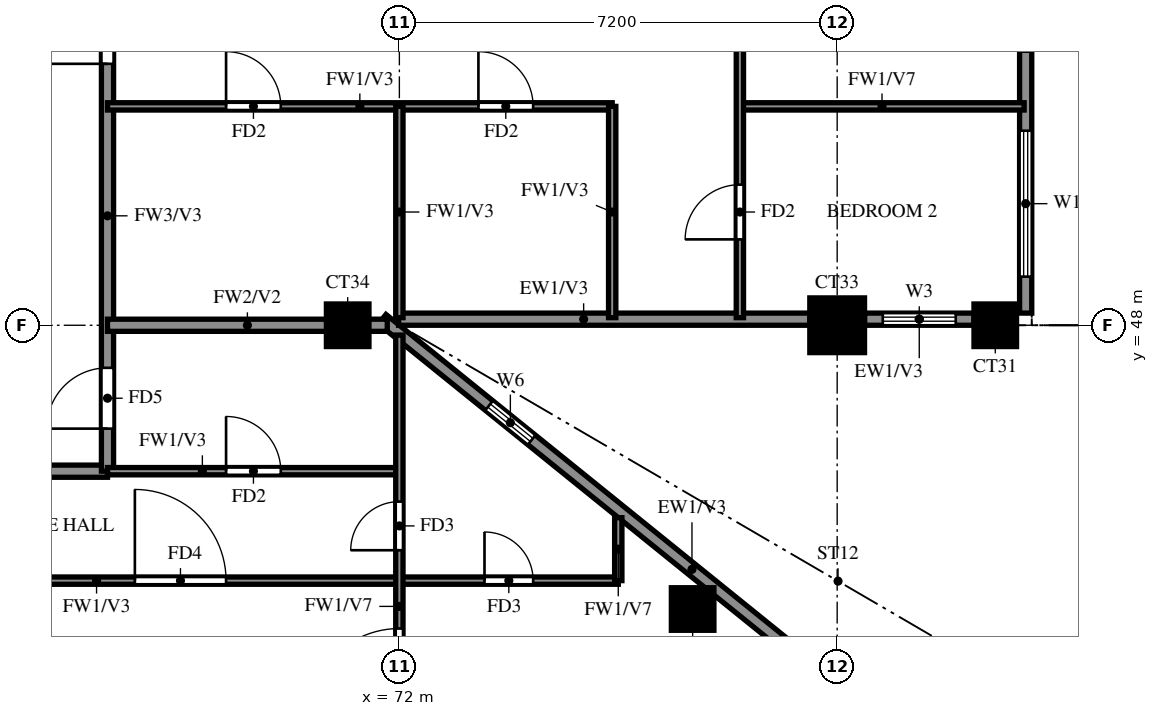
"""IFC4 building model, lengths in metres.
Left out: names, types, materials, properties, quantities, classifications, styles, units other than length and angle.
Written with IfcOpenShell. Run it as: python <this file> out.ifc"""

import sys

from ifc_helpers import new_model, si_unit, direction, frame, frame_2d, origin, origin_2d, place, context, subcontext, project, spatial, rectangle, extrude, source, transform, mapped, element, fill, save


model = new_model("IFC4")
c1 = context("Model", 3, precision=1e-05, world=origin(), true_north=direction((0.0, 1.0)))
c2 = subcontext(c1, "Body", "Model", "MODEL_VIEW")
j1 = project(units=[si_unit("LENGTHUNIT", "METRE"), si_unit("PLANEANGLEUNIT", "RADIAN")], contexts=[c1])
p1 = place(None, origin())
s1 = spatial("IfcSite", under=j1, at=p1, CompositionType="ELEMENT")
p2 = place(p1, origin())
s2 = spatial("IfcBuilding", under=s1, at=p2, CompositionType="ELEMENT")
p3 = place(p2, frame((0.0, 0.0, 211.5)))
s3 = spatial("IfcBuildingStorey", under=s2, at=p3, CompositionType="ELEMENT", Elevation=211.5)
m1 = source(origin(), c2, "Body", "SweptSolid", [
    extrude(rectangle(XDim=0.7, YDim=0.7, at=origin_2d()), origin(), (0.0, 0.0, 1.0), 3.5),
])
p4 = place(p3, frame((76.823, 43.333, -0.28), z_axis=(0.0, 0.0, 1.0), x_axis=(1.0, 0.0, 0.0)))
e1 = element("IfcColumn", 1, at=p4, inside=s3, PredefinedType="COLUMN", context=c2, shape_type="MappedRepresentation", body=[
    mapped(m1, transform((0.0, 0.0, 0.0))),
])
m2 = source(origin(), c2, "Body", "SweptSolid", [
    extrude(rectangle(XDim=0.7, YDim=0.7, at=origin_2d()), origin(), (0.0, 0.0, 1.0), 3.22),
])
p5 = place(p3, frame((71.15, 48.0, 0.0), z_axis=(0.0, 0.0, 1.0), x_axis=(1.0, 0.0, 0.0)))
e2 = element("IfcColumn", 2, at=p5, inside=s3, PredefinedType="COLUMN", context=c2, shape_type="MappedRepresentation", body=[
    mapped(m2, transform((0.0, 0.0, 0.0))),
])
m3 = source(origin(), c2, "Body", "SweptSolid", [
    extrude(rectangle(XDim=0.9, YDim=0.9, at=origin_2d()), origin(), (0.0, 0.0, 1.0), 3.22),
])
p6 = place(p3, frame((79.2, 48.0, 0.0), z_axis=(0.0, 0.0, 1.0), x_axis=(1.0, 0.0, 0.0)))
e3 = element("IfcColumn", 3, at=p6, inside=s3, PredefinedType="COLUMN", context=c2, shape_type="MappedRepresentation", body=[
    mapped(m3, transform((0.0, 0.0, 0.0))),
])
p7 = place(p3, frame((81.8, 48.0, -0.28), z_axis=(0.0, 0.0, 1.0), x_axis=(1.0, 0.0, 0.0)))
e4 = element("IfcColumn", 4, at=p7, inside=s3, PredefinedType="COLUMN", context=c2, shape_type="MappedRepresentation", body=[
    mapped(m1, transform((0.0, 0.0, 0.0))),
])
p8 = place(p3, frame((81.907, 39.87, 0.0), z_axis=(0.0, 0.0, 1.0), x_axis=(-0.777936274417, 0.62834318087, 0.0)))
e5 = element("IfcWall", 5, at=p8, inside=s3, PredefinedType="SOLIDWALL", context=c2, shape_type="SweptSolid", body=[
    extrude(rectangle(XDim=13.099, YDim=0.2, at=frame_2d((6.549, 0.0))), origin(), (0.0, 0.0, 1.0), 3.22),
])
p9 = place(p8, frame((2.201, 0.0, 0.0)))
e6 = element("IfcOpeningElement", 6, at=p9, cuts=e5, PredefinedType="OPENING", context=c2, shape_type="SweptSolid", body=[
    extrude(rectangle(XDim=1.8, YDim=2.4, at=frame_2d((0.9, 1.2))), frame((0.0, 0.11, 0.0), z_axis=(0.0, -1.0, 0.0), x_axis=(1.0, 0.0, 0.0)), (0.0, 0.0, 1.0), 0.22),
])
p10 = place(p8, frame((9.938, 0.0, 1.5)))
e7 = element("IfcOpeningElement", 7, at=p10, cuts=e5, PredefinedType="OPENING", context=c2, shape_type="SweptSolid", body=[
    extrude(rectangle(XDim=0.9, YDim=0.9, at=frame_2d((0.45, 0.45))), frame((0.0, 0.11, 0.0), z_axis=(0.0, -1.0, 0.0), x_axis=(1.0, 0.0, 0.0)), (0.0, 0.0, 1.0), 0.22),
])
p11 = place(p3, frame((71.987, 48.1, 0.0), z_axis=(0.0, 0.0, 1.0), x_axis=(1.0, 0.0, 0.0)))
e8 = element("IfcWall", 8, at=p11, inside=s3, PredefinedType="SOLIDWALL", context=c2, shape_type="SweptSolid", body=[
    extrude(rectangle(XDim=6.763, YDim=0.2, at=frame_2d((3.381, 0.0))), origin(), (0.0, 0.0, 1.0), 3.22),
])
p12 = place(p3, frame((79.65, 48.1, 0.0), z_axis=(0.0, 0.0, 1.0), x_axis=(1.0, 0.0, 0.0)))
e9 = element("IfcWall", 9, at=p12, inside=s3, PredefinedType="SOLIDWALL", context=c2, shape_type="SweptSolid", body=[
    extrude(rectangle(XDim=1.8, YDim=0.2, at=frame_2d((0.9, 0.0))), origin(), (0.0, 0.0, 1.0), 3.22),
])
p13 = place(p12, frame((0.3, 0.0, 0.6)))
e10 = element("IfcOpeningElement", 10, at=p13, cuts=e9, PredefinedType="OPENING", context=c2, shape_type="SweptSolid", body=[
    extrude(rectangle(XDim=1.2, YDim=2.4, at=frame_2d((0.6, 1.2))), frame((0.0, 0.11, 0.0), z_axis=(0.0, -1.0, 0.0), x_axis=(1.0, 0.0, 0.0)), (0.0, 0.0, 1.0), 0.22),
])
p14 = place(p3, frame((82.3, 48.2, 0.0), z_axis=(0.0, 0.0, 1.0), x_axis=(0.0, 1.0, 0.0)))
e11 = element("IfcWall", 11, at=p14, inside=s3, PredefinedType="SOLIDWALL", context=c2, shape_type="SweptSolid", body=[
    extrude(rectangle(XDim=28.6, YDim=0.2, at=frame_2d((14.3, 0.0))), origin(), (0.0, 0.0, 1.0), 3.22),
])
p15 = place(p14, frame((4.3, 0.0, 0.0)))
e12 = element("IfcOpeningElement", 12, at=p15, cuts=e11, PredefinedType="OPENING", context=c2, shape_type="SweptSolid", body=[
    extrude(rectangle(XDim=1.8, YDim=2.4, at=frame_2d((0.9, 1.2))), frame((0.0, 0.11, 0.0), z_axis=(0.0, -1.0, 0.0), x_axis=(1.0, 0.0, 0.0)), (0.0, 0.0, 1.0), 0.22),
])
p16 = place(p14, frame((0.6, 0.0, 0.6)))
e13 = element("IfcOpeningElement", 13, at=p16, cuts=e11, PredefinedType="OPENING", context=c2, shape_type="SweptSolid", body=[
    extrude(rectangle(XDim=2.4, YDim=2.4, at=frame_2d((1.2, 1.2))), frame((0.0, 0.11, 0.0), z_axis=(0.0, -1.0, 0.0), x_axis=(1.0, 0.0, 0.0)), (0.0, 0.0, 1.0), 0.22),
])
p17 = place(p14, frame((7.3, 0.0, 0.6)))
e14 = element("IfcOpeningElement", 14, at=p17, cuts=e11, PredefinedType="OPENING", context=c2, shape_type="SweptSolid", body=[
    extrude(rectangle(XDim=2.4, YDim=2.4, at=frame_2d((1.2, 1.2))), frame((0.0, 0.11, 0.0), z_axis=(0.0, -1.0, 0.0), x_axis=(1.0, 0.0, 0.0)), (0.0, 0.0, 1.0), 0.22),
])
p18 = place(p14, frame((11.2, 0.0, 0.6)))
e15 = element("IfcOpeningElement", 15, at=p18, cuts=e11, PredefinedType="OPENING", context=c2, shape_type="SweptSolid", body=[
    extrude(rectangle(XDim=2.4, YDim=2.4, at=frame_2d((1.2, 1.2))), frame((0.0, 0.11, 0.0), z_axis=(0.0, -1.0, 0.0), x_axis=(1.0, 0.0, 0.0)), (0.0, 0.0, 1.0), 0.22),
])
p19 = place(p14, frame((15.033, 0.0, 0.6)))
e16 = element("IfcOpeningElement", 16, at=p19, cuts=e11, PredefinedType="OPENING", context=c2, shape_type="SweptSolid", body=[
    extrude(rectangle(XDim=2.4, YDim=2.4, at=frame_2d((1.2, 1.2))), frame((0.0, 0.11, 0.0), z_axis=(0.0, -1.0, 0.0), x_axis=(1.0, 0.0, 0.0)), (0.0, 0.0, 1.0), 0.22),
])
p20 = place(p14, frame((18.167, 0.0, 0.6)))
e17 = element("IfcOpeningElement", 17, at=p20, cuts=e11, PredefinedType="OPENING", context=c2, shape_type="SweptSolid", body=[
    extrude(rectangle(XDim=2.4, YDim=2.4, at=frame_2d((1.2, 1.2))), frame((0.0, 0.11, 0.0), z_axis=(0.0, -1.0, 0.0), x_axis=(1.0, 0.0, 0.0)), (0.0, 0.0, 1.0), 0.22),
])
p21 = place(p14, frame((22.75, 0.0, 1.5)))
e18 = element("IfcOpeningElement", 18, at=p21, cuts=e11, PredefinedType="OPENING", context=c2, shape_type="SweptSolid", body=[
    extrude(rectangle(XDim=0.9, YDim=0.9, at=frame_2d((0.45, 0.45))), frame((0.0, 0.11, 0.0), z_axis=(0.0, -1.0, 0.0), x_axis=(1.0, 0.0, 0.0)), (0.0, 0.0, 1.0), 0.22),
])
p22 = place(p14, frame((25.5, 0.0, 0.6)))
e19 = element("IfcOpeningElement", 19, at=p22, cuts=e11, PredefinedType="OPENING", context=c2, shape_type="SweptSolid", body=[
    extrude(rectangle(XDim=2.4, YDim=2.4, at=frame_2d((1.2, 1.2))), frame((0.0, 0.11, 0.0), z_axis=(0.0, -1.0, 0.0), x_axis=(1.0, 0.0, 0.0)), (0.0, 0.0, 1.0), 0.22),
])
p23 = place(p3, frame((60.0, 45.6, 0.0), z_axis=(0.0, 0.0, 1.0), x_axis=(1.0, 0.0, 0.0)))
e20 = element("IfcWall", 20, at=p23, inside=s3, PredefinedType="SOLIDWALL", context=c2, shape_type="SweptSolid", body=[
    extrude(rectangle(XDim=7.2, YDim=0.2, at=frame_2d((3.6, 0.0))), origin(), (0.0, 0.0, 1.0), 3.22),
])
p24 = place(p3, frame((67.2, 45.6, 0.0), z_axis=(0.0, 0.0, 1.0), x_axis=(0.0, 1.0, 0.0)))
e21 = element("IfcWall", 21, at=p24, inside=s3, PredefinedType="SOLIDWALL", context=c2, shape_type="SweptSolid", body=[
    extrude(rectangle(XDim=8.4, YDim=0.2, at=frame_2d((4.2, 0.0))), origin(), (0.0, 0.0, 1.0), 3.22),
])
p25 = place(p24, frame((6.7, 0.0, 0.0)))
e22 = element("IfcOpeningElement", 22, at=p25, cuts=e21, PredefinedType="OPENING", context=c2, shape_type="SweptSolid", body=[
    extrude(rectangle(XDim=1.0, YDim=2.1, at=frame_2d((0.5, 1.05))), frame((0.0, 0.11, 0.0), z_axis=(0.0, -1.0, 0.0), x_axis=(1.0, 0.0, 0.0)), (0.0, 0.0, 1.0), 0.22),
])
p26 = place(p24, frame((0.7, 0.0, 0.0)))
e23 = element("IfcOpeningElement", 23, at=p26, cuts=e21, PredefinedType="OPENING", context=c2, shape_type="SweptSolid", body=[
    extrude(rectangle(XDim=1.0, YDim=2.1, at=frame_2d((0.5, 1.05))), frame((0.0, 0.11, 0.0), z_axis=(0.0, -1.0, 0.0), x_axis=(1.0, 0.0, 0.0)), (0.0, 0.0, 1.0), 0.22),
])
p27 = place(p3, frame((67.2, 48.0, 0.0), z_axis=(0.0, 0.0, 1.0), x_axis=(1.0, 0.0, 0.0)))
e24 = element("IfcWall", 24, at=p27, inside=s3, PredefinedType="SOLIDWALL", context=c2, shape_type="SweptSolid", body=[
    extrude(rectangle(XDim=4.601, YDim=0.2, at=frame_2d((2.301, 0.0))), origin(), (0.0, 0.0, 1.0), 3.22),
])
p28 = place(p3, frame((60.0, 43.8, 0.0), z_axis=(0.0, 0.0, 1.0), x_axis=(1.0, 0.0, 0.0)))
e25 = element("IfcWall", 25, at=p28, inside=s3, PredefinedType="PARTITIONING", context=c2, shape_type="SweptSolid", body=[
    extrude(rectangle(XDim=15.6, YDim=0.12, at=frame_2d((7.8, 0.0))), origin(), (0.0, 0.0, 1.0), 3.22),
])
p29 = place(p28, frame((7.65, 0.0, 0.0)))
e26 = element("IfcOpeningElement", 26, at=p29, cuts=e25, PredefinedType="OPENING", context=c2, shape_type="SweptSolid", body=[
    extrude(rectangle(XDim=1.5, YDim=2.1, at=frame_2d((0.75, 1.05))), frame((0.0, 0.07, 0.0), z_axis=(0.0, -1.0, 0.0), x_axis=(1.0, 0.0, 0.0)), (0.0, 0.0, 1.0), 0.14),
])
p30 = place(p28, frame((1.95, 0.0, 0.0)))
e27 = element("IfcOpeningElement", 27, at=p30, cuts=e25, PredefinedType="OPENING", context=c2, shape_type="SweptSolid", body=[
    extrude(rectangle(XDim=0.9, YDim=2.1, at=frame_2d((0.45, 1.05))), frame((0.0, 0.07, 0.0), z_axis=(0.0, -1.0, 0.0), x_axis=(1.0, 0.0, 0.0)), (0.0, 0.0, 1.0), 0.14),
])
p31 = place(p28, frame((13.4, 0.0, 0.0)))
e28 = element("IfcOpeningElement", 28, at=p31, cuts=e25, PredefinedType="OPENING", context=c2, shape_type="SweptSolid", body=[
    extrude(rectangle(XDim=0.8, YDim=2.1, at=frame_2d((0.4, 1.05))), frame((0.0, 0.07, 0.0), z_axis=(0.0, -1.0, 0.0), x_axis=(1.0, 0.0, 0.0)), (0.0, 0.0, 1.0), 0.14),
])
p32 = place(p3, frame((67.2, 45.6, 0.0), z_axis=(0.0, 0.0, 1.0), x_axis=(1.0, 0.0, 0.0)))
e29 = element("IfcWall", 29, at=p32, inside=s3, PredefinedType="PARTITIONING", context=c2, shape_type="SweptSolid", body=[
    extrude(rectangle(XDim=4.8, YDim=0.12, at=frame_2d((2.4, 0.0))), origin(), (0.0, 0.0, 1.0), 3.22),
])
p33 = place(p32, frame((1.95, 0.0, 0.0)))
e30 = element("IfcOpeningElement", 30, at=p33, cuts=e29, PredefinedType="OPENING", context=c2, shape_type="SweptSolid", body=[
    extrude(rectangle(XDim=0.9, YDim=2.1, at=frame_2d((0.45, 1.05))), frame((0.0, 0.07, 0.0), z_axis=(0.0, -1.0, 0.0), x_axis=(1.0, 0.0, 0.0)), (0.0, 0.0, 1.0), 0.14),
])
p34 = place(p3, frame((67.2, 51.6, 0.0), z_axis=(0.0, 0.0, 1.0), x_axis=(1.0, 0.0, 0.0)))
e31 = element("IfcWall", 31, at=p34, inside=s3, PredefinedType="PARTITIONING", context=c2, shape_type="SweptSolid", body=[
    extrude(rectangle(XDim=8.3, YDim=0.12, at=frame_2d((4.15, 0.0))), origin(), (0.0, 0.0, 1.0), 3.22),
])
p35 = place(p34, frame((6.1, 0.0, 0.0)))
e32 = element("IfcOpeningElement", 32, at=p35, cuts=e31, PredefinedType="OPENING", context=c2, shape_type="SweptSolid", body=[
    extrude(rectangle(XDim=0.9, YDim=2.1, at=frame_2d((0.45, 1.05))), frame((0.0, 0.07, 0.0), z_axis=(0.0, -1.0, 0.0), x_axis=(1.0, 0.0, 0.0)), (0.0, 0.0, 1.0), 0.14),
])
p36 = place(p34, frame((1.95, 0.0, 0.0)))
e33 = element("IfcOpeningElement", 33, at=p36, cuts=e31, PredefinedType="OPENING", context=c2, shape_type="SweptSolid", body=[
    extrude(rectangle(XDim=0.9, YDim=2.1, at=frame_2d((0.45, 1.05))), frame((0.0, 0.07, 0.0), z_axis=(0.0, -1.0, 0.0), x_axis=(1.0, 0.0, 0.0)), (0.0, 0.0, 1.0), 0.14),
])
p37 = place(p3, frame((77.6, 51.6, 0.0), z_axis=(0.0, 0.0, 1.0), x_axis=(1.0, 0.0, 0.0)))
e34 = element("IfcWall", 34, at=p37, inside=s3, PredefinedType="PARTITIONING", context=c2, shape_type="SweptSolid", body=[
    extrude(rectangle(XDim=4.675, YDim=0.12, at=frame_2d((2.337, 0.0))), origin(), (0.0, 0.0, 1.0), 2.32),
])
p38 = place(p3, frame((72.0, 39.725, 0.0), z_axis=(0.0, 0.0, 1.0), x_axis=(0.0, 1.0, 0.0)))
e35 = element("IfcWall", 35, at=p38, inside=s3, PredefinedType="PARTITIONING", context=c2, shape_type="SweptSolid", body=[
    extrude(rectangle(XDim=8.114, YDim=0.12, at=frame_2d((4.057, 0.0))), origin(), (0.0, 0.0, 1.0), 2.32),
])
p39 = place(p38, frame((1.788, 0.0, 0.0)))
e36 = element("IfcOpeningElement", 36, at=p39, cuts=e35, PredefinedType="OPENING", context=c2, shape_type="SweptSolid", body=[
    extrude(rectangle(XDim=1.5, YDim=2.1, at=frame_2d((0.75, 1.05))), frame((0.0, 0.07, 0.0), z_axis=(0.0, -1.0, 0.0), x_axis=(1.0, 0.0, 0.0)), (0.0, 0.0, 1.0), 0.14),
])
p40 = place(p38, frame((4.575, 0.0, 0.0)))
e37 = element("IfcOpeningElement", 37, at=p40, cuts=e35, PredefinedType="OPENING", context=c2, shape_type="SweptSolid", body=[
    extrude(rectangle(XDim=0.8, YDim=2.1, at=frame_2d((0.4, 1.05))), frame((0.0, 0.07, 0.0), z_axis=(0.0, -1.0, 0.0), x_axis=(1.0, 0.0, 0.0)), (0.0, 0.0, 1.0), 0.14),
])
for number, where, z_axis, x_axis in (
    (38, (72.0, 48.125, 0.0), (0.0, 0.0, 1.0), (0.0, 1.0, 0.0)),
    (39, (75.5, 48.125, 0.0), (0.0, 0.0, 1.0), (0.0, 1.0, 0.0)),
):
    element("IfcWall", number, at=place(p3, frame(where, z_axis=z_axis, x_axis=x_axis)), inside=s3, PredefinedType="PARTITIONING", context=c2, shape_type="SweptSolid", body=[
        extrude(rectangle(XDim=3.475, YDim=0.12, at=frame_2d((1.738, 0.0))), origin(), (0.0, 0.0, 1.0), 3.22),
    ])
p41 = place(p3, frame((75.6, 43.8, 0.0), z_axis=(0.0, 0.0, 1.0), x_axis=(0.0, 1.0, 0.0)))
e40 = element("IfcWall", 40, at=p41, inside=s3, PredefinedType="PARTITIONING", context=c2, shape_type="SweptSolid", body=[
    extrude(rectangle(XDim=1.035, YDim=0.12, at=frame_2d((0.518, 0.0))), origin(), (0.0, 0.0, 1.0), 2.32),
])
p42 = place(p3, frame((77.6, 48.125, 0.0), z_axis=(0.0, 0.0, 1.0), x_axis=(0.0, 1.0, 0.0)))
e41 = element("IfcWall", 41, at=p42, inside=s3, PredefinedType="PARTITIONING", context=c2, shape_type="SweptSolid", body=[
    extrude(rectangle(XDim=21.475, YDim=0.12, at=frame_2d((10.738, 0.0))), origin(), (0.0, 0.0, 1.0), 3.22),
])
p43 = place(p42, frame((1.288, 0.0, 0.0)))
e42 = element("IfcOpeningElement", 42, at=p43, cuts=e41, PredefinedType="OPENING", context=c2, shape_type="SweptSolid", body=[
    extrude(rectangle(XDim=0.9, YDim=2.1, at=frame_2d((0.45, 1.05))), frame((0.0, 0.07, 0.0), z_axis=(0.0, -1.0, 0.0), x_axis=(1.0, 0.0, 0.0)), (0.0, 0.0, 1.0), 0.14),
])
p44 = place(p42, frame((7.825, 0.0, 0.0)))
e43 = element("IfcOpeningElement", 43, at=p44, cuts=e41, PredefinedType="OPENING", context=c2, shape_type="SweptSolid", body=[
    extrude(rectangle(XDim=1.5, YDim=2.1, at=frame_2d((0.75, 1.05))), frame((0.0, 0.07, 0.0), z_axis=(0.0, -1.0, 0.0), x_axis=(1.0, 0.0, 0.0)), (0.0, 0.0, 1.0), 0.14),
])
p45 = place(p42, frame((12.025, 0.0, 0.0)))
e44 = element("IfcOpeningElement", 44, at=p45, cuts=e41, PredefinedType="OPENING", context=c2, shape_type="SweptSolid", body=[
    extrude(rectangle(XDim=0.9, YDim=2.1, at=frame_2d((0.45, 1.05))), frame((0.0, 0.07, 0.0), z_axis=(0.0, -1.0, 0.0), x_axis=(1.0, 0.0, 0.0)), (0.0, 0.0, 1.0), 0.14),
])
p46 = place(p42, frame((17.425, 0.0, 0.0)))
e45 = element("IfcOpeningElement", 45, at=p46, cuts=e41, PredefinedType="OPENING", context=c2, shape_type="SweptSolid", body=[
    extrude(rectangle(XDim=0.9, YDim=2.1, at=frame_2d((0.45, 1.05))), frame((0.0, 0.07, 0.0), z_axis=(0.0, -1.0, 0.0), x_axis=(1.0, 0.0, 0.0)), (0.0, 0.0, 1.0), 0.14),
])
p47 = place(p10, origin())
e46 = element("IfcWindow", 46, at=p47, inside=s3, PartitioningType="SINGLE_PANEL", PredefinedType="WINDOW", context=c2, shape_type="SweptSolid", body=[
    extrude(rectangle(XDim=0.9, YDim=0.9, at=frame_2d((0.45, 0.45))), frame((0.0, 0.03, 0.0), z_axis=(0.0, -1.0, 0.0), x_axis=(1.0, 0.0, 0.0)), (0.0, 0.0, 1.0), 0.06),
])
fill(e7, e46)
p48 = place(p13, origin())
e47 = element("IfcWindow", 47, at=p48, inside=s3, PartitioningType="SINGLE_PANEL", PredefinedType="WINDOW", context=c2, shape_type="SweptSolid", body=[
    extrude(rectangle(XDim=1.2, YDim=2.4, at=frame_2d((0.6, 1.2))), frame((0.0, 0.03, 0.0), z_axis=(0.0, -1.0, 0.0), x_axis=(1.0, 0.0, 0.0)), (0.0, 0.0, 1.0), 0.06),
])
fill(e10, e47)
p49 = place(p15, origin())
e48 = element("IfcDoor", 48, at=p49, inside=s3, OperationType="DOUBLE_DOOR_SLIDING", PredefinedType="DOOR", context=c2, shape_type="SweptSolid", body=[
    extrude(rectangle(XDim=1.8, YDim=2.4, at=frame_2d((0.9, 1.2))), frame((0.0, 0.025, 0.0), z_axis=(0.0, -1.0, 0.0), x_axis=(1.0, 0.0, 0.0)), (0.0, 0.0, 1.0), 0.05),
])
fill(e12, e48)
p50 = place(p16, origin())
e49 = element("IfcWindow", 49, at=p50, inside=s3, PartitioningType="DOUBLE_PANEL_VERTICAL", PredefinedType="WINDOW", context=c2, shape_type="SweptSolid", body=[
    extrude(rectangle(XDim=2.4, YDim=2.4, at=frame_2d((1.2, 1.2))), frame((0.0, 0.03, 0.0), z_axis=(0.0, -1.0, 0.0), x_axis=(1.0, 0.0, 0.0)), (0.0, 0.0, 1.0), 0.06),
])
fill(e13, e49)
p51 = place(p25, origin())
e50 = element("IfcDoor", 50, at=p51, inside=s3, OperationType="SINGLE_SWING_RIGHT", PredefinedType="DOOR", context=c2, shape_type="SweptSolid", body=[
    extrude(rectangle(XDim=1.0, YDim=2.1, at=frame_2d((0.5, 1.05))), frame((0.0, 0.025, 0.0), z_axis=(0.0, -1.0, 0.0), x_axis=(1.0, 0.0, 0.0)), (0.0, 0.0, 1.0), 0.05),
])
fill(e22, e50)
p52 = place(p43, origin())
e51 = element("IfcDoor", 51, at=p52, inside=s3, OperationType="SINGLE_SWING_LEFT", PredefinedType="DOOR", context=c2, shape_type="SweptSolid", body=[
    extrude(rectangle(XDim=0.9, YDim=2.1, at=frame_2d((0.45, 1.05))), frame((0.0, 0.025, 0.0), z_axis=(0.0, -1.0, 0.0), x_axis=(1.0, 0.0, 0.0)), (0.0, 0.0, 1.0), 0.05),
])
fill(e42, e51)
p53 = place(p35, origin())
e52 = element("IfcDoor", 52, at=p53, inside=s3, OperationType="SINGLE_SWING_RIGHT", PredefinedType="DOOR", context=c2, shape_type="SweptSolid", body=[
    extrude(rectangle(XDim=0.9, YDim=2.1, at=frame_2d((0.45, 1.05))), frame((0.0, 0.025, 0.0), z_axis=(0.0, -1.0, 0.0), x_axis=(1.0, 0.0, 0.0)), (0.0, 0.0, 1.0), 0.05),
])
fill(e32, e52)
p54 = place(p36, origin())
e53 = element("IfcDoor", 53, at=p54, inside=s3, OperationType="SINGLE_SWING_LEFT", PredefinedType="DOOR", context=c2, shape_type="SweptSolid", body=[
    extrude(rectangle(XDim=0.9, YDim=2.1, at=frame_2d((0.45, 1.05))), frame((0.0, 0.025, 0.0), z_axis=(0.0, -1.0, 0.0), x_axis=(1.0, 0.0, 0.0)), (0.0, 0.0, 1.0), 0.05),
])
fill(e33, e53)
p55 = place(p33, origin())
e54 = element("IfcDoor", 54, at=p55, inside=s3, OperationType="SINGLE_SWING_RIGHT", PredefinedType="DOOR", context=c2, shape_type="SweptSolid", body=[
    extrude(rectangle(XDim=0.9, YDim=2.1, at=frame_2d((0.45, 1.05))), frame((0.0, 0.025, 0.0), z_axis=(0.0, -1.0, 0.0), x_axis=(1.0, 0.0, 0.0)), (0.0, 0.0, 1.0), 0.05),
])
fill(e30, e54)
p56 = place(p26, origin())
e55 = element("IfcDoor", 55, at=p56, inside=s3, OperationType="SINGLE_SWING_LEFT", PredefinedType="DOOR", context=c2, shape_type="SweptSolid", body=[
    extrude(rectangle(XDim=1.0, YDim=2.1, at=frame_2d((0.5, 1.05))), frame((0.0, 0.025, 0.0), z_axis=(0.0, -1.0, 0.0), x_axis=(1.0, 0.0, 0.0)), (0.0, 0.0, 1.0), 0.05),
])
fill(e23, e55)
p57 = place(p29, origin())
e56 = element("IfcDoor", 56, at=p57, inside=s3, OperationType="SINGLE_SWING_LEFT", PredefinedType="DOOR", context=c2, shape_type="SweptSolid", body=[
    extrude(rectangle(XDim=1.5, YDim=2.1, at=frame_2d((0.75, 1.05))), frame((0.0, 0.025, 0.0), z_axis=(0.0, -1.0, 0.0), x_axis=(1.0, 0.0, 0.0)), (0.0, 0.0, 1.0), 0.05),
])
fill(e26, e56)
p58 = place(p39, origin())
e57 = element("IfcDoor", 57, at=p58, inside=s3, OperationType="SINGLE_SWING_RIGHT", PredefinedType="DOOR", context=c2, shape_type="SweptSolid", body=[
    extrude(rectangle(XDim=1.5, YDim=2.1, at=frame_2d((0.75, 1.05))), frame((0.0, 0.025, 0.0), z_axis=(0.0, -1.0, 0.0), x_axis=(1.0, 0.0, 0.0)), (0.0, 0.0, 1.0), 0.05),
])
fill(e36, e57)
p59 = place(p40, origin())
e58 = element("IfcDoor", 58, at=p59, inside=s3, OperationType="SINGLE_SWING_LEFT", PredefinedType="DOOR", context=c2, shape_type="SweptSolid", body=[
    extrude(rectangle(XDim=0.8, YDim=2.1, at=frame_2d((0.4, 1.05))), frame((0.0, 0.025, 0.0), z_axis=(0.0, -1.0, 0.0), x_axis=(1.0, 0.0, 0.0)), (0.0, 0.0, 1.0), 0.05),
])
fill(e37, e58)
p60 = place(p31, origin())
e59 = element("IfcDoor", 59, at=p60, inside=s3, OperationType="SINGLE_SWING_RIGHT", PredefinedType="DOOR", context=c2, shape_type="SweptSolid", body=[
    extrude(rectangle(XDim=0.8, YDim=2.1, at=frame_2d((0.4, 1.05))), frame((0.0, 0.025, 0.0), z_axis=(0.0, -1.0, 0.0), x_axis=(1.0, 0.0, 0.0)), (0.0, 0.0, 1.0), 0.05),
])
fill(e28, e59)
save(model, sys.argv[1])
